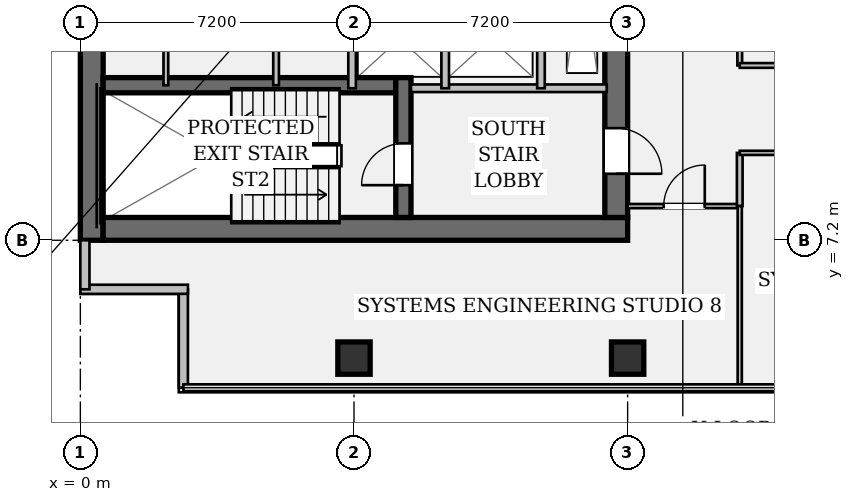
"""IFC4 building model, lengths in metres.
Left out: names, types, materials, properties, quantities, classifications, styles, units other than length and angle.
Written with IfcOpenShell. Run it as: python <this file> out.ifc"""

import sys

from ifc_helpers import new_model, si_unit, direction, frame, frame_2d, origin, origin_2d, place, context, subcontext, project, spatial, rectangle, hollow_rectangle, extrude, element, fill, save


model = new_model("IFC4")
c1 = context("Model", 3, precision=1e-05, world=origin(), true_north=direction((0.0, 1.0)))
c2 = subcontext(c1, "Body", "Model", "MODEL_VIEW")
j1 = project(units=[si_unit("LENGTHUNIT", "METRE"), si_unit("PLANEANGLEUNIT", "RADIAN")], contexts=[c1])
p1 = place(None, origin())
s1 = spatial("IfcSite", under=j1, at=p1, CompositionType="ELEMENT")
p2 = place(p1, origin())
s2 = spatial("IfcBuilding", under=s1, at=p2, CompositionType="ELEMENT")
p3 = place(p2, frame((0.0, 0.0, 148.4)))
s3 = spatial("IfcBuildingStorey", under=s2, at=p3, CompositionType="ELEMENT", Elevation=148.4)
p4 = place(p3, frame((0.3, 7.2, 0.0), z_axis=(0.0, 0.0, 1.0), x_axis=(0.0, 1.0, 0.0)))
e1 = element("IfcWall", 1, at=p4, inside=s3, PredefinedType="SHEAR", context=c2, shape_type="SweptSolid", body=[
    extrude(rectangle(XDim=28.8, YDim=0.6, at=frame_2d((14.4, 0.0))), origin(), (0.0, 0.0, 1.0), 3.58),
])
p5 = place(p3, frame((0.6, 7.5, 0.0), z_axis=(0.0, 0.0, 1.0), x_axis=(1.0, 0.0, 0.0)))
e2 = element("IfcWall", 2, at=p5, inside=s3, PredefinedType="SHEAR", context=c2, shape_type="SweptSolid", body=[
    extrude(rectangle(XDim=13.8, YDim=0.6, at=frame_2d((6.9, 0.0))), origin(), (0.0, 0.0, 1.0), 3.58),
])
p6 = place(p3, frame((14.1, 35.4, 0.0), z_axis=(0.0, 0.0, 1.0), x_axis=(0.0, -1.0, 0.0)))
e3 = element("IfcWall", 3, at=p6, inside=s3, PredefinedType="SHEAR", context=c2, shape_type="SweptSolid", body=[
    extrude(rectangle(XDim=27.6, YDim=0.6, at=frame_2d((13.8, 0.0))), origin(), (0.0, 0.0, 1.0), 3.58),
])
p7 = place(p6, frame((1.3, 0.0, 0.0)))
e4 = element("IfcOpeningElement", 4, at=p7, cuts=e3, PredefinedType="OPENING", context=c2, shape_type="SweptSolid", body=[
    extrude(rectangle(XDim=1.2, YDim=2.15, at=frame_2d((0.6, 1.075))), frame((0.0, 0.312, 0.0), z_axis=(0.0, -1.0, 0.0), x_axis=(1.0, 0.0, 0.0)), (0.0, 0.0, 1.0), 0.624),
])
p8 = place(p6, frame((25.25, 0.0, 0.0)))
e5 = element("IfcOpeningElement", 5, at=p8, cuts=e3, PredefinedType="OPENING", context=c2, shape_type="SweptSolid", body=[
    extrude(rectangle(XDim=1.2, YDim=2.15, at=frame_2d((0.6, 1.075))), frame((0.0, 0.312, 0.0), z_axis=(0.0, -1.0, 0.0), x_axis=(1.0, 0.0, 0.0)), (0.0, 0.0, 1.0), 0.624),
])
p9 = place(p6, frame((14.6, 0.0, 0.0)))
e6 = element("IfcOpeningElement", 6, at=p9, cuts=e3, PredefinedType="OPENING", context=c2, shape_type="SweptSolid", body=[
    extrude(rectangle(XDim=1.6, YDim=2.2, at=frame_2d((0.8, 1.1))), frame((0.0, 0.312, 0.0), z_axis=(0.0, -1.0, 0.0), x_axis=(1.0, 0.0, 0.0)), (0.0, 0.0, 1.0), 0.624),
])
p10 = place(p3, frame((0.6, 11.28, 0.0), z_axis=(0.0, 0.0, 1.0), x_axis=(1.0, 0.0, 0.0)))
e7 = element("IfcWall", 7, at=p10, inside=s3, PredefinedType="SHEAR", context=c2, shape_type="SweptSolid", body=[
    extrude(rectangle(XDim=7.7, YDim=0.4, at=frame_2d((3.85, 0.0))), origin(), (0.0, 0.0, 1.0), 3.58),
])
p11 = place(p3, frame((8.5, 7.8, 0.0), z_axis=(0.0, 0.0, 1.0), x_axis=(0.0, 1.0, 0.0)))
e8 = element("IfcWall", 8, at=p11, inside=s3, PredefinedType="SHEAR", context=c2, shape_type="SweptSolid", body=[
    extrude(rectangle(XDim=3.68, YDim=0.4, at=frame_2d((1.84, 0.0))), origin(), (0.0, 0.0, 1.0), 3.58),
])
p12 = place(p11, frame((0.85, 0.0, 0.0)))
e9 = element("IfcOpeningElement", 9, at=p12, cuts=e8, PredefinedType="OPENING", context=c2, shape_type="SweptSolid", body=[
    extrude(rectangle(XDim=1.1, YDim=2.15, at=frame_2d((0.55, 1.075))), frame((0.0, 0.212, 0.0), z_axis=(0.0, -1.0, 0.0), x_axis=(1.0, 0.0, 0.0)), (0.0, 0.0, 1.0), 0.424),
])
for number, where, z_axis, x_axis in (
    (10, (7.2, 4.1, 0.0), (0.0, 0.0, 1.0), (1.0, 0.0, 0.0)),
    (11, (14.4, 4.1, 0.0), (0.0, 0.0, 1.0), (1.0, 0.0, 0.0)),
):
    element("IfcColumn", number, at=place(p3, frame(where, z_axis=z_axis, x_axis=x_axis)), inside=s3, PredefinedType="COLUMN", context=c2, shape_type="SweptSolid", body=[
        extrude(hollow_rectangle(XDim=0.85, YDim=0.85, WallThickness=0.05, at=origin_2d()), origin(), (0.0, 0.0, 1.0), 3.58),
    ])
p13 = place(p3, frame((2.71, 3.32, 0.0), z_axis=(0.0, 0.0, 1.0), x_axis=(0.0, 1.0, 0.0)))
e12 = element("IfcWall", 12, at=p13, inside=s3, PredefinedType="STANDARD", context=c2, shape_type="SweptSolid", body=[
    extrude(rectangle(XDim=2.59, YDim=0.24, at=frame_2d((1.295, 0.0))), origin(), (0.0, 0.0, 1.0), 3.58),
])
p14 = place(p3, frame((2.83, 5.91, 0.0), z_axis=(0.0, 0.0, 1.0), x_axis=(-1.0, 0.0, 0.0)))
e13 = element("IfcWall", 13, at=p14, inside=s3, PredefinedType="STANDARD", context=c2, shape_type="SweptSolid", body=[
    extrude(rectangle(XDim=2.83, YDim=0.24, at=frame_2d((1.415, 0.0))), origin(), (0.0, 0.0, 1.0), 3.58),
])
p15 = place(p3, frame((0.12, 5.91, 0.0), z_axis=(0.0, 0.0, 1.0), x_axis=(0.0, 1.0, 0.0)))
e14 = element("IfcWall", 14, at=p15, inside=s3, PredefinedType="STANDARD", context=c2, shape_type="SweptSolid", body=[
    extrude(rectangle(XDim=1.29, YDim=0.24, at=frame_2d((0.645, 0.0))), origin(), (0.0, 0.0, 1.0), 3.58),
])
p16 = place(p3, frame((8.7, 11.2, 0.0), z_axis=(0.0, 0.0, 1.0), x_axis=(1.0, 0.0, 0.0)))
e15 = element("IfcWall", 15, at=p16, inside=s3, PredefinedType="PARTITIONING", context=c2, shape_type="SweptSolid", body=[
    extrude(rectangle(XDim=5.15, YDim=0.2, at=frame_2d((2.575, 0.0))), origin(), (0.0, 0.0, 1.0), 3.58),
])
for number, where, z_axis, x_axis in (
    (16, (7.15, 11.2, 0.0), (0.0, 0.0, 1.0), (0.0, 1.0, 0.0)),
    (17, (9.6, 11.2, 0.0), (0.0, 0.0, 1.0), (0.0, 1.0, 0.0)),
):
    element("IfcWall", number, at=place(p3, frame(where, z_axis=z_axis, x_axis=x_axis)), inside=s3, PredefinedType="PARTITIONING", context=c2, shape_type="SweptSolid", body=[
        extrude(rectangle(XDim=2.4, YDim=0.2, at=frame_2d((1.2, 0.0))), origin(), (0.0, 0.0, 1.0), 3.58),
    ])
p17 = place(p3, frame((12.12, 11.2, 0.0), z_axis=(0.0, 0.0, 1.0), x_axis=(0.0, 1.0, 0.0)))
e18 = element("IfcWall", 18, at=p17, inside=s3, PredefinedType="PARTITIONING", context=c2, shape_type="SweptSolid", body=[
    extrude(rectangle(XDim=6.6, YDim=0.2, at=frame_2d((3.3, 0.0))), origin(), (0.0, 0.0, 1.0), 3.58),
])
p18 = place(p17, frame((2.95, 0.0, 0.0)))
e19 = element("IfcOpeningElement", 19, at=p18, cuts=e18, PredefinedType="OPENING", context=c2, shape_type="SweptSolid", body=[
    extrude(rectangle(XDim=0.85, YDim=2.15, at=frame_2d((0.425, 1.075))), frame((0.0, 0.112, 0.0), z_axis=(0.0, -1.0, 0.0), x_axis=(1.0, 0.0, 0.0)), (0.0, 0.0, 1.0), 0.224),
])
p19 = place(p3, frame((5.15, 11.28, 0.0), z_axis=(0.0, 0.0, 1.0), x_axis=(0.0, 1.0, 0.0)))
e20 = element("IfcWall", 20, at=p19, inside=s3, PredefinedType="PARTITIONING", context=c2, shape_type="SweptSolid", body=[
    extrude(rectangle(XDim=4.42, YDim=0.15, at=frame_2d((2.21, 0.0))), origin(), (0.0, 0.0, 1.0), 3.58),
])
p20 = place(p3, frame((2.25, 11.28, 0.0), z_axis=(0.0, 0.0, 1.0), x_axis=(0.0, 1.0, 0.0)))
e21 = element("IfcWall", 21, at=p20, inside=s3, PredefinedType="PARTITIONING", context=c2, shape_type="SweptSolid", body=[
    extrude(rectangle(XDim=4.42, YDim=0.125, at=frame_2d((2.21, 0.0))), origin(), (0.0, 0.0, 1.0), 3.58),
])
p21 = place(p20, frame((1.65, 0.0, 0.0)))
e22 = element("IfcOpeningElement", 22, at=p21, cuts=e21, PredefinedType="OPENING", context=c2, shape_type="SweptSolid", body=[
    extrude(rectangle(XDim=0.85, YDim=2.15, at=frame_2d((0.425, 1.075))), frame((0.0, 0.074, 0.0), z_axis=(0.0, -1.0, 0.0), x_axis=(1.0, 0.0, 0.0)), (0.0, 0.0, 1.0), 0.149),
])
p22 = place(p3, frame((14.4, 8.1, 0.0), z_axis=(0.0, 0.0, 1.0), x_axis=(1.0, 0.0, 0.0)))
e23 = element("IfcWall", 23, at=p22, inside=s3, PredefinedType="PARTITIONING", context=c2, shape_type="SweptSolid", body=[
    extrude(rectangle(XDim=2.95, YDim=0.11, at=frame_2d((1.475, 0.0))), origin(), (0.0, 0.0, 1.0), 3.148),
])
p23 = place(p22, frame((0.95, 0.0, 0.0)))
e24 = element("IfcOpeningElement", 24, at=p23, cuts=e23, PredefinedType="OPENING", context=c2, shape_type="SweptSolid", body=[
    extrude(rectangle(XDim=1.08, YDim=2.15, at=frame_2d((0.54, 1.075))), frame((0.0, 0.067, 0.0), z_axis=(0.0, -1.0, 0.0), x_axis=(1.0, 0.0, 0.0)), (0.0, 0.0, 1.0), 0.134),
])
p24 = place(p3, frame((17.35, 8.1, 0.0), z_axis=(0.0, 0.0, 1.0), x_axis=(0.0, 1.0, 0.0)))
e25 = element("IfcWall", 25, at=p24, inside=s3, PredefinedType="PARTITIONING", context=c2, shape_type="SweptSolid", body=[
    extrude(rectangle(XDim=1.4, YDim=0.15, at=frame_2d((0.7, 0.0))), origin(), (0.0, 0.0, 1.0), 3.58),
])
p25 = place(p3, frame((17.35, 9.5, 0.0), z_axis=(0.0, 0.0, 1.0), x_axis=(1.0, 0.0, 0.0)))
e26 = element("IfcWall", 26, at=p25, inside=s3, PredefinedType="PARTITIONING", context=c2, shape_type="SweptSolid", body=[
    extrude(rectangle(XDim=15.75, YDim=0.11, at=frame_2d((7.875, 0.0))), origin(), (0.0, 0.0, 1.0), 2.869),
])
p26 = place(p25, frame((3.73, 0.0, 0.0)))
e27 = element("IfcOpeningElement", 27, at=p26, cuts=e26, PredefinedType="OPENING", context=c2, shape_type="SweptSolid", body=[
    extrude(rectangle(XDim=1.08, YDim=2.15, at=frame_2d((0.54, 1.075))), frame((0.0, 0.067, 0.0), z_axis=(0.0, -1.0, 0.0), x_axis=(1.0, 0.0, 0.0)), (0.0, 0.0, 1.0), 0.134),
])
p27 = place(p25, frame((11.6, 0.0, 0.0)))
e28 = element("IfcOpeningElement", 28, at=p27, cuts=e26, PredefinedType="OPENING", context=c2, shape_type="SweptSolid", body=[
    extrude(rectangle(XDim=1.08, YDim=2.15, at=frame_2d((0.54, 1.075))), frame((0.0, 0.067, 0.0), z_axis=(0.0, -1.0, 0.0), x_axis=(1.0, 0.0, 0.0)), (0.0, 0.0, 1.0), 0.134),
])
p28 = place(p3, frame((17.35, 11.8, 0.0), z_axis=(0.0, 0.0, 1.0), x_axis=(0.0, 1.0, 0.0)))
e29 = element("IfcWall", 29, at=p28, inside=s3, PredefinedType="PARTITIONING", context=c2, shape_type="SweptSolid", body=[
    extrude(rectangle(XDim=6.55, YDim=0.125, at=frame_2d((3.275, 0.0))), origin(), (0.0, 0.0, 1.0), 2.869),
])
p29 = place(p3, frame((17.35, 11.8, 0.0), z_axis=(0.0, 0.0, 1.0), x_axis=(1.0, 0.0, 0.0)))
e30 = element("IfcWall", 30, at=p29, inside=s3, PredefinedType="PARTITIONING", context=c2, shape_type="SweptSolid", body=[
    extrude(rectangle(XDim=13.4, YDim=0.125, at=frame_2d((6.7, 0.0))), origin(), (0.0, 0.0, 1.0), 2.869),
])
p30 = place(p3, frame((17.35, 3.32, 0.0), z_axis=(0.0, 0.0, 1.0), x_axis=(0.0, 1.0, 0.0)))
e31 = element("IfcWall", 31, at=p30, inside=s3, PredefinedType="PARTITIONING", context=c2, shape_type="SweptSolid", body=[
    extrude(rectangle(XDim=4.78, YDim=0.11, at=frame_2d((2.39, 0.0))), origin(), (0.0, 0.0, 1.0), 2.869),
])
p31 = place(p12, origin())
e32 = element("IfcDoor", 32, at=p31, inside=s3, OperationType="SINGLE_SWING_LEFT", PredefinedType="DOOR", context=c2, shape_type="SweptSolid", body=[
    extrude(rectangle(XDim=1.1, YDim=2.15, at=frame_2d((0.55, 1.075))), frame((0.0, 0.025, 0.0), z_axis=(0.0, -1.0, 0.0), x_axis=(1.0, 0.0, 0.0)), (0.0, 0.0, 1.0), 0.05),
])
fill(e9, e32)
p32 = place(p8, origin())
e33 = element("IfcDoor", 33, at=p32, inside=s3, OperationType="SINGLE_SWING_RIGHT", PredefinedType="DOOR", context=c2, shape_type="SweptSolid", body=[
    extrude(rectangle(XDim=1.2, YDim=2.15, at=frame_2d((0.6, 1.075))), frame((0.0, 0.025, 0.0), z_axis=(0.0, -1.0, 0.0), x_axis=(1.0, 0.0, 0.0)), (0.0, 0.0, 1.0), 0.05),
])
fill(e5, e33)
p33 = place(p23, origin())
e34 = element("IfcDoor", 34, at=p33, inside=s3, OperationType="SINGLE_SWING_RIGHT", PredefinedType="DOOR", context=c2, shape_type="SweptSolid", body=[
    extrude(rectangle(XDim=1.08, YDim=2.15, at=frame_2d((0.54, 1.075))), frame((0.0, 0.025, 0.0), z_axis=(0.0, -1.0, 0.0), x_axis=(1.0, 0.0, 0.0)), (0.0, 0.0, 1.0), 0.05),
])
fill(e24, e34)
save(model, sys.argv[1])
